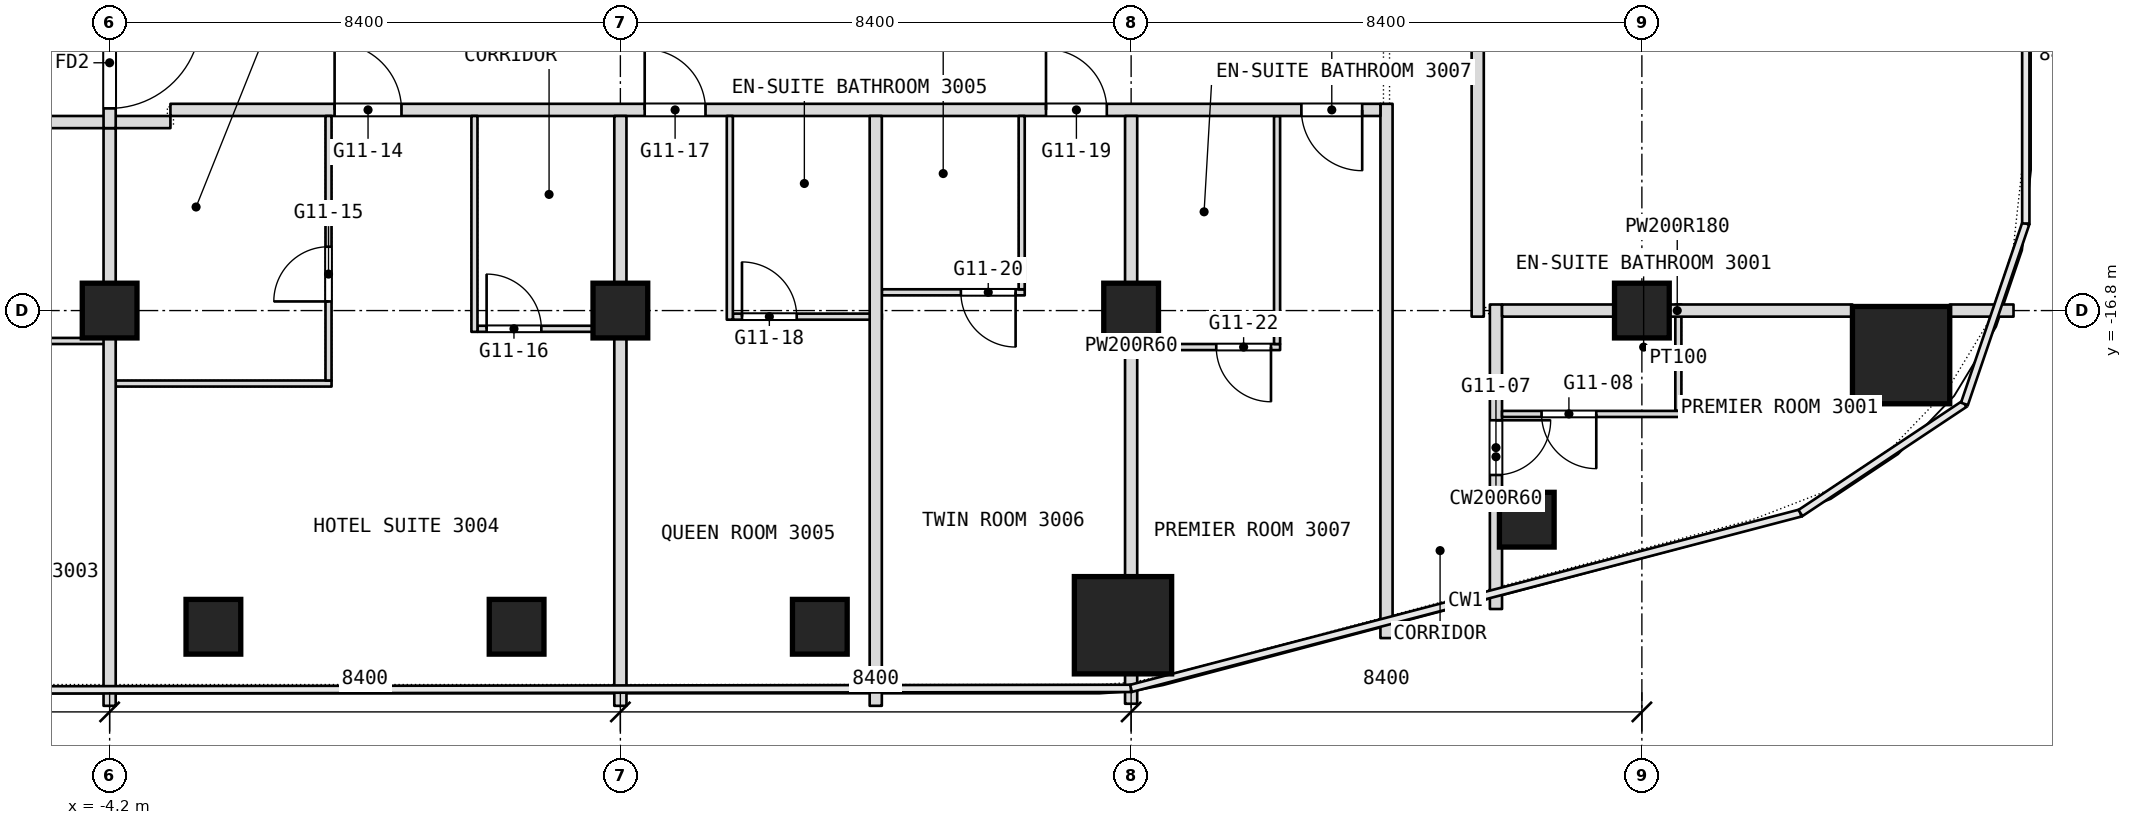
"""IFC4 building model, lengths in metres.
Left out: names, types, materials, properties, quantities, classifications, styles, units other than length and angle.
Written with IfcOpenShell. Run it as: python <this file> out.ifc"""

import sys

from ifc_helpers import new_model, si_unit, direction, frame, frame_2d, origin, origin_2d, place, context, subcontext, project, spatial, rectangle, extrude, element, fill, save


model = new_model("IFC4")
c1 = context("Model", 3, precision=1e-05, world=origin(), true_north=direction((0.0, 1.0)))
c2 = subcontext(c1, "Body", "Model", "MODEL_VIEW")
j1 = project(units=[si_unit("LENGTHUNIT", "METRE"), si_unit("PLANEANGLEUNIT", "RADIAN")], contexts=[c1])
p1 = place(None, origin())
s1 = spatial("IfcSite", under=j1, at=p1, CompositionType="ELEMENT")
p2 = place(p1, origin())
s2 = spatial("IfcBuilding", under=s1, at=p2, CompositionType="ELEMENT")
p3 = place(p2, frame((0.0, 0.0, 133.7)))
s3 = spatial("IfcBuildingStorey", under=s2, at=p3, CompositionType="ELEMENT", Elevation=133.7)
for number, where, z_axis, x_axis in (
    (1, (12.466, -21.975, 0.0), (0.0, 0.0, 1.0), (1.0, 0.0, 0.0)),
    (2, (25.263, -17.533, 0.0), (0.0, 0.0, 1.0), (1.0, 0.0, 0.0)),
):
    element("IfcColumn", number, at=place(p3, frame(where, z_axis=z_axis, x_axis=x_axis)), inside=s3, PredefinedType="COLUMN", context=c2, shape_type="SweptSolid", body=[
        extrude(rectangle(XDim=1.6, YDim=1.6, at=origin_2d()), origin(), (0.0, 0.0, 1.0), 3.6),
    ])
for number, where, z_axis, x_axis in (
    (3, (-4.2, -16.8, 0.0), (0.0, 0.0, 1.0), (1.0, 0.0, 0.0)),
    (4, (4.2, -16.8, 0.0), (0.0, 0.0, 1.0), (1.0, 0.0, 0.0)),
    (5, (12.6, -16.8, 0.0), (0.0, 0.0, 1.0), (1.0, 0.0, 0.0)),
    (6, (21.0, -16.8, 0.0), (0.0, 0.0, 1.0), (1.0, 0.0, 0.0)),
    (7, (19.107, -20.239, 0.0), (0.0, 0.0, 1.0), (1.0, 0.0, 0.0)),
    (8, (7.48, -22.0, 0.0), (0.0, 0.0, 1.0), (1.0, 0.0, 0.0)),
    (9, (2.493, -22.0, 0.0), (0.0, 0.0, 1.0), (1.0, 0.0, 0.0)),
    (10, (-2.493, -22.0, 0.0), (0.0, 0.0, 1.0), (1.0, 0.0, 0.0)),
):
    element("IfcColumn", number, at=place(p3, frame(where, z_axis=z_axis, x_axis=x_axis)), inside=s3, PredefinedType="COLUMN", context=c2, shape_type="SweptSolid", body=[
        extrude(rectangle(XDim=0.9, YDim=0.9, at=origin_2d()), origin(), (0.0, 0.0, 1.0), 3.6),
    ])
p4 = place(p3, frame((21.6, -18.45, 0.0), z_axis=(0.0, 0.0, 1.0), x_axis=(0.0, 1.0, 0.0)))
e11 = element("IfcWall", 11, at=p4, inside=s3, PredefinedType="PARTITIONING", context=c2, shape_type="SweptSolid", body=[
    extrude(rectangle(XDim=1.75, YDim=0.1, at=frame_2d((0.875, 0.0))), origin(), (0.0, 0.0, 1.0), 3.34),
])
p5 = place(p3, frame((18.6, -21.708, 0.0), z_axis=(0.0, 0.0, 1.0), x_axis=(0.0, 1.0, 0.0)))
e12 = element("IfcWall", 12, at=p5, inside=s3, PredefinedType="PARTITIONING", context=c2, shape_type="SweptSolid", body=[
    extrude(rectangle(XDim=5.008, YDim=0.2, at=frame_2d((2.504, 0.0))), origin(), (0.0, 0.0, 1.0), 3.34),
])
p6 = place(p5, frame((2.204, 0.0, 0.0)))
e13 = element("IfcOpeningElement", 13, at=p6, cuts=e12, PredefinedType="OPENING", context=c2, shape_type="SweptSolid", body=[
    extrude(rectangle(XDim=0.9, YDim=2.1, at=frame_2d((0.45, 1.05))), frame((0.0, 0.1, 0.0), z_axis=(0.0, -1.0, 0.0), x_axis=(1.0, 0.0, 0.0)), (0.0, 0.0, 1.0), 0.2),
])
p7 = place(p3, frame((18.7, -18.5, 0.0), z_axis=(0.0, 0.0, 1.0), x_axis=(1.0, 0.0, 0.0)))
e14 = element("IfcWall", 14, at=p7, inside=s3, PredefinedType="PARTITIONING", context=c2, shape_type="SweptSolid", body=[
    extrude(rectangle(XDim=2.95, YDim=0.1, at=frame_2d((1.475, 0.0))), origin(), (0.0, 0.0, 1.0), 3.34),
])
p8 = place(p7, frame((0.65, 0.0, 0.0)))
e15 = element("IfcOpeningElement", 15, at=p8, cuts=e14, PredefinedType="OPENING", context=c2, shape_type="SweptSolid", body=[
    extrude(rectangle(XDim=0.9, YDim=2.1, at=frame_2d((0.45, 1.05))), frame((0.0, 0.05, 0.0), z_axis=(0.0, -1.0, 0.0), x_axis=(1.0, 0.0, 0.0)), (0.0, 0.0, 1.0), 0.1),
])
p9 = place(p3, frame((18.3, -16.9, 0.0), z_axis=(0.0, 0.0, 1.0), x_axis=(0.0, 1.0, 0.0)))
e16 = element("IfcWall", 16, at=p9, inside=s3, PredefinedType="PARTITIONING", context=c2, shape_type="SweptSolid", body=[
    extrude(rectangle(XDim=33.6, YDim=0.2, at=frame_2d((16.8, 0.0))), origin(), (0.0, 0.0, 1.0), 3.34),
])
p10 = place(p3, frame((-4.1, -18.0, 0.0), z_axis=(0.0, 0.0, 1.0), x_axis=(1.0, 0.0, 0.0)))
e17 = element("IfcWall", 17, at=p10, inside=s3, PredefinedType="PARTITIONING", context=c2, shape_type="SweptSolid", body=[
    extrude(rectangle(XDim=3.55, YDim=0.1, at=frame_2d((1.775, 0.0))), origin(), (0.0, 0.0, 1.0), 3.34),
])
p11 = place(p3, frame((12.7, -17.4, 0.0), z_axis=(0.0, 0.0, 1.0), x_axis=(1.0, 0.0, 0.0)))
e18 = element("IfcWall", 18, at=p11, inside=s3, PredefinedType="PARTITIONING", context=c2, shape_type="SweptSolid", body=[
    extrude(rectangle(XDim=2.35, YDim=0.1, at=frame_2d((1.175, 0.0))), origin(), (0.0, 0.0, 1.0), 3.34),
])
p12 = place(p11, frame((1.3, 0.0, 0.0)))
e19 = element("IfcOpeningElement", 19, at=p12, cuts=e18, PredefinedType="OPENING", context=c2, shape_type="SweptSolid", body=[
    extrude(rectangle(XDim=0.9, YDim=2.1, at=frame_2d((0.45, 1.05))), frame((0.0, 0.05, 0.0), z_axis=(0.0, -1.0, 0.0), x_axis=(1.0, 0.0, 0.0)), (0.0, 0.0, 1.0), 0.1),
])
p13 = place(p3, frame((-6.55, -17.3, 0.0), z_axis=(0.0, 0.0, 1.0), x_axis=(1.0, 0.0, 0.0)))
e20 = element("IfcWall", 20, at=p13, inside=s3, PredefinedType="PARTITIONING", context=c2, shape_type="SweptSolid", body=[
    extrude(rectangle(XDim=2.45, YDim=0.1, at=frame_2d((1.225, 0.0))), origin(), (0.0, 0.0, 1.0), 3.34),
])
p14 = place(p13, frame((0.15, 0.0, 0.0)))
e21 = element("IfcOpeningElement", 21, at=p14, cuts=e20, PredefinedType="OPENING", context=c2, shape_type="SweptSolid", body=[
    extrude(rectangle(XDim=0.9, YDim=2.1, at=frame_2d((0.45, 1.05))), frame((0.0, 0.05, 0.0), z_axis=(0.0, -1.0, 0.0), x_axis=(1.0, 0.0, 0.0)), (0.0, 0.0, 1.0), 0.1),
])
p15 = place(p3, frame((1.85, -17.1, 0.0), z_axis=(0.0, 0.0, 1.0), x_axis=(1.0, 0.0, 0.0)))
e22 = element("IfcWall", 22, at=p15, inside=s3, PredefinedType="PARTITIONING", context=c2, shape_type="SweptSolid", body=[
    extrude(rectangle(XDim=2.45, YDim=0.1, at=frame_2d((1.225, 0.0))), origin(), (0.0, 0.0, 1.0), 3.34),
])
p16 = place(p15, frame((0.15, 0.0, 0.0)))
e23 = element("IfcOpeningElement", 23, at=p16, cuts=e22, PredefinedType="OPENING", context=c2, shape_type="SweptSolid", body=[
    extrude(rectangle(XDim=0.9, YDim=2.1, at=frame_2d((0.45, 1.05))), frame((0.0, 0.05, 0.0), z_axis=(0.0, -1.0, 0.0), x_axis=(1.0, 0.0, 0.0)), (0.0, 0.0, 1.0), 0.1),
])
p17 = place(p3, frame((6.05, -16.9, 0.0), z_axis=(0.0, 0.0, 1.0), x_axis=(1.0, 0.0, 0.0)))
e24 = element("IfcWall", 24, at=p17, inside=s3, PredefinedType="PARTITIONING", context=c2, shape_type="SweptSolid", body=[
    extrude(rectangle(XDim=2.45, YDim=0.1, at=frame_2d((1.225, 0.0))), origin(), (0.0, 0.0, 1.0), 2.89),
])
p18 = place(p17, frame((0.15, 0.0, 0.0)))
e25 = element("IfcOpeningElement", 25, at=p18, cuts=e24, PredefinedType="OPENING", context=c2, shape_type="SweptSolid", body=[
    extrude(rectangle(XDim=0.9, YDim=2.1, at=frame_2d((0.45, 1.05))), frame((0.0, 0.05, 0.0), z_axis=(0.0, -1.0, 0.0), x_axis=(1.0, 0.0, 0.0)), (0.0, 0.0, 1.0), 0.1),
])
p19 = place(p3, frame((16.8, -22.186, 0.0), z_axis=(0.0, 0.0, 1.0), x_axis=(0.0, 1.0, 0.0)))
e26 = element("IfcWall", 26, at=p19, inside=s3, PredefinedType="PARTITIONING", context=c2, shape_type="SweptSolid", body=[
    extrude(rectangle(XDim=8.786, YDim=0.2, at=frame_2d((4.393, 0.0))), origin(), (0.0, 0.0, 1.0), 3.34),
])
p20 = place(p3, frame((18.7, -16.8, 0.0), z_axis=(0.0, 0.0, 1.0), x_axis=(1.0, 0.0, 0.0)))
e27 = element("IfcWall", 27, at=p20, inside=s3, PredefinedType="PARTITIONING", context=c2, shape_type="SweptSolid", body=[
    extrude(rectangle(XDim=5.763, YDim=0.2, at=frame_2d((2.881, 0.0))), origin(), (0.0, 0.0, 1.0), 2.89),
])
p21 = place(p3, frame((26.063, -16.8, 0.0), z_axis=(0.0, 0.0, 1.0), x_axis=(1.0, 0.0, 0.0)))
e28 = element("IfcWall", 28, at=p21, inside=s3, PredefinedType="PARTITIONING", context=c2, shape_type="SweptSolid", body=[
    extrude(rectangle(XDim=1.049, YDim=0.2, at=frame_2d((0.524, 0.0))), origin(), (0.0, 0.0, 1.0), 3.34),
])
p22 = place(p3, frame((8.5, -16.5, 0.0), z_axis=(0.0, 0.0, 1.0), x_axis=(1.0, 0.0, 0.0)))
e29 = element("IfcWall", 29, at=p22, inside=s3, PredefinedType="PARTITIONING", context=c2, shape_type="SweptSolid", body=[
    extrude(rectangle(XDim=2.35, YDim=0.1, at=frame_2d((1.175, 0.0))), origin(), (0.0, 0.0, 1.0), 3.34),
])
p23 = place(p22, frame((1.3, 0.0, 0.0)))
e30 = element("IfcOpeningElement", 30, at=p23, cuts=e29, PredefinedType="OPENING", context=c2, shape_type="SweptSolid", body=[
    extrude(rectangle(XDim=0.9, YDim=2.1, at=frame_2d((0.45, 1.05))), frame((0.0, 0.05, 0.0), z_axis=(0.0, -1.0, 0.0), x_axis=(1.0, 0.0, 0.0)), (0.0, 0.0, 1.0), 0.1),
])
p24 = place(p3, frame((15.0, -17.35, 0.0), z_axis=(0.0, 0.0, 1.0), x_axis=(0.0, 1.0, 0.0)))
e31 = element("IfcWall", 31, at=p24, inside=s3, PredefinedType="PARTITIONING", context=c2, shape_type="SweptSolid", body=[
    extrude(rectangle(XDim=3.75, YDim=0.1, at=frame_2d((1.875, 0.0))), origin(), (0.0, 0.0, 1.0), 3.34),
])
p25 = place(p3, frame((-12.4, -13.7, 0.0), z_axis=(0.0, 0.0, 1.0), x_axis=(1.0, 0.0, 0.0)))
e32 = element("IfcWall", 32, at=p25, inside=s3, PredefinedType="PARTITIONING", context=c2, shape_type="SweptSolid", body=[
    extrude(rectangle(XDim=9.2, YDim=0.2, at=frame_2d((4.6, 0.0))), origin(), (0.0, 0.0, 1.0), 3.34),
])
p26 = place(p25, frame((1.35, 0.0, 0.0)))
e33 = element("IfcOpeningElement", 33, at=p26, cuts=e32, PredefinedType="OPENING", context=c2, shape_type="SweptSolid", body=[
    extrude(rectangle(XDim=1.1, YDim=2.1, at=frame_2d((0.55, 1.05))), frame((0.0, 0.1, 0.0), z_axis=(0.0, -1.0, 0.0), x_axis=(1.0, 0.0, 0.0)), (0.0, 0.0, 1.0), 0.2),
])
p27 = place(p3, frame((-3.2, -13.5, 0.0), z_axis=(0.0, 0.0, 1.0), x_axis=(1.0, 0.0, 0.0)))
e34 = element("IfcWall", 34, at=p27, inside=s3, PredefinedType="PARTITIONING", context=c2, shape_type="SweptSolid", body=[
    extrude(rectangle(XDim=19.9, YDim=0.2, at=frame_2d((9.95, 0.0))), origin(), (0.0, 0.0, 1.0), 3.34),
])
p28 = place(p27, frame((2.7, 0.0, 0.0)))
e35 = element("IfcOpeningElement", 35, at=p28, cuts=e34, PredefinedType="OPENING", context=c2, shape_type="SweptSolid", body=[
    extrude(rectangle(XDim=1.1, YDim=2.1, at=frame_2d((0.55, 1.05))), frame((0.0, 0.1, 0.0), z_axis=(0.0, -1.0, 0.0), x_axis=(1.0, 0.0, 0.0)), (0.0, 0.0, 1.0), 0.2),
])
p29 = place(p27, frame((7.8, 0.0, 0.0)))
e36 = element("IfcOpeningElement", 36, at=p29, cuts=e34, PredefinedType="OPENING", context=c2, shape_type="SweptSolid", body=[
    extrude(rectangle(XDim=1.0, YDim=2.1, at=frame_2d((0.5, 1.05))), frame((0.0, 0.1, 0.0), z_axis=(0.0, -1.0, 0.0), x_axis=(1.0, 0.0, 0.0)), (0.0, 0.0, 1.0), 0.2),
])
p30 = place(p27, frame((14.4, 0.0, 0.0)))
e37 = element("IfcOpeningElement", 37, at=p30, cuts=e34, PredefinedType="OPENING", context=c2, shape_type="SweptSolid", body=[
    extrude(rectangle(XDim=1.0, YDim=2.1, at=frame_2d((0.5, 1.05))), frame((0.0, 0.1, 0.0), z_axis=(0.0, -1.0, 0.0), x_axis=(1.0, 0.0, 0.0)), (0.0, 0.0, 1.0), 0.2),
])
p31 = place(p27, frame((18.6, 0.0, 0.0)))
e38 = element("IfcOpeningElement", 38, at=p31, cuts=e34, PredefinedType="OPENING", context=c2, shape_type="SweptSolid", body=[
    extrude(rectangle(XDim=1.0, YDim=2.1, at=frame_2d((0.5, 1.05))), frame((0.0, 0.1, 0.0), z_axis=(0.0, -1.0, 0.0), x_axis=(1.0, 0.0, 0.0)), (0.0, 0.0, 1.0), 0.2),
])
p32 = place(p3, frame((12.6, -23.266, 0.0), z_axis=(0.0, 0.0, 1.0), x_axis=(0.0, 1.0, 0.0)))
e39 = element("IfcWall", 39, at=p32, inside=s3, PredefinedType="PARTITIONING", context=c2, shape_type="SweptSolid", body=[
    extrude(rectangle(XDim=0.491, YDim=0.2, at=frame_2d((0.246, 0.0))), origin(), (0.0, 0.0, 1.0), 3.34),
])
p33 = place(p3, frame((12.6, -21.175, 0.0), z_axis=(0.0, 0.0, 1.0), x_axis=(0.0, 1.0, 0.0)))
e40 = element("IfcWall", 40, at=p33, inside=s3, PredefinedType="PARTITIONING", context=c2, shape_type="SweptSolid", body=[
    extrude(rectangle(XDim=7.575, YDim=0.2, at=frame_2d((3.788, 0.0))), origin(), (0.0, 0.0, 1.0), 3.34),
])
p34 = place(p3, frame((10.8, -16.45, 0.0), z_axis=(0.0, 0.0, 1.0), x_axis=(0.0, 1.0, 0.0)))
e41 = element("IfcWall", 41, at=p34, inside=s3, PredefinedType="PARTITIONING", context=c2, shape_type="SweptSolid", body=[
    extrude(rectangle(XDim=2.85, YDim=0.1, at=frame_2d((1.425, 0.0))), origin(), (0.0, 0.0, 1.0), 3.34),
])
p35 = place(p3, frame((8.4, -23.3, 0.0), z_axis=(0.0, 0.0, 1.0), x_axis=(0.0, 1.0, 0.0)))
e42 = element("IfcWall", 42, at=p35, inside=s3, PredefinedType="PARTITIONING", context=c2, shape_type="SweptSolid", body=[
    extrude(rectangle(XDim=9.7, YDim=0.2, at=frame_2d((4.85, 0.0))), origin(), (0.0, 0.0, 1.0), 3.34),
])
p36 = place(p3, frame((6.0, -16.95, 0.0), z_axis=(0.0, 0.0, 1.0), x_axis=(0.0, 1.0, 0.0)))
e43 = element("IfcWall", 43, at=p36, inside=s3, PredefinedType="PARTITIONING", context=c2, shape_type="SweptSolid", body=[
    extrude(rectangle(XDim=3.35, YDim=0.1, at=frame_2d((1.675, 0.0))), origin(), (0.0, 0.0, 1.0), 3.34),
])
p37 = place(p3, frame((4.2, -23.3, 0.0), z_axis=(0.0, 0.0, 1.0), x_axis=(0.0, 1.0, 0.0)))
e44 = element("IfcWall", 44, at=p37, inside=s3, PredefinedType="PARTITIONING", context=c2, shape_type="SweptSolid", body=[
    extrude(rectangle(XDim=9.7, YDim=0.2, at=frame_2d((4.85, 0.0))), origin(), (0.0, 0.0, 1.0), 3.34),
])
p38 = place(p3, frame((1.8, -17.15, 0.0), z_axis=(0.0, 0.0, 1.0), x_axis=(0.0, 1.0, 0.0)))
e45 = element("IfcWall", 45, at=p38, inside=s3, PredefinedType="PARTITIONING", context=c2, shape_type="SweptSolid", body=[
    extrude(rectangle(XDim=3.55, YDim=0.1, at=frame_2d((1.775, 0.0))), origin(), (0.0, 0.0, 1.0), 3.34),
])
p39 = place(p3, frame((-0.6, -17.95, 0.0), z_axis=(0.0, 0.0, 1.0), x_axis=(0.0, 1.0, 0.0)))
e46 = element("IfcWall", 46, at=p39, inside=s3, PredefinedType="PARTITIONING", context=c2, shape_type="SweptSolid", body=[
    extrude(rectangle(XDim=4.35, YDim=0.1, at=frame_2d((2.175, 0.0))), origin(), (0.0, 0.0, 1.0), 3.34),
])
p40 = place(p39, frame((1.3, 0.0, 0.0)))
e47 = element("IfcOpeningElement", 47, at=p40, cuts=e46, PredefinedType="OPENING", context=c2, shape_type="SweptSolid", body=[
    extrude(rectangle(XDim=0.9, YDim=2.1, at=frame_2d((0.45, 1.05))), frame((0.0, 0.05, 0.0), z_axis=(0.0, -1.0, 0.0), x_axis=(1.0, 0.0, 0.0)), (0.0, 0.0, 1.0), 0.1),
])
p41 = place(p3, frame((-4.2, -23.3, 0.0), z_axis=(0.0, 0.0, 1.0), x_axis=(0.0, 1.0, 0.0)))
e48 = element("IfcWall", 48, at=p41, inside=s3, PredefinedType="PARTITIONING", context=c2, shape_type="SweptSolid", body=[
    extrude(rectangle(XDim=9.5, YDim=0.2, at=frame_2d((4.75, 0.0))), origin(), (0.0, 0.0, 1.0), 3.34),
])
p42 = place(p3, frame((-4.2, -13.8, 0.0), z_axis=(0.0, 0.0, 1.0), x_axis=(0.0, 1.0, 0.0)))
e49 = element("IfcWall", 49, at=p42, inside=s3, PredefinedType="PARTITIONING", context=c2, shape_type="SweptSolid", body=[
    extrude(rectangle(XDim=13.8, YDim=0.2, at=frame_2d((6.9, 0.0))), origin(), (0.0, 0.0, 1.0), 3.34),
])
p43 = place(p42, frame((12.15, 0.0, 0.0)))
e50 = element("IfcOpeningElement", 50, at=p43, cuts=e49, PredefinedType="OPENING", context=c2, shape_type="SweptSolid", body=[
    extrude(rectangle(XDim=1.5, YDim=2.1, at=frame_2d((0.75, 1.05))), frame((0.0, 0.1, 0.0), z_axis=(0.0, -1.0, 0.0), x_axis=(1.0, 0.0, 0.0)), (0.0, 0.0, 1.0), 0.2),
])
p44 = place(p42, frame((0.325, 0.0, 0.0)))
e51 = element("IfcOpeningElement", 51, at=p44, cuts=e49, PredefinedType="OPENING", context=c2, shape_type="SweptSolid", body=[
    extrude(rectangle(XDim=1.5, YDim=2.1, at=frame_2d((0.75, 1.05))), frame((0.0, 0.1, 0.0), z_axis=(0.0, -1.0, 0.0), x_axis=(1.0, 0.0, 0.0)), (0.0, 0.0, 1.0), 0.2),
])
p45 = place(p6, origin())
e52 = element("IfcDoor", 52, at=p45, inside=s3, OperationType="SINGLE_SWING_LEFT", PredefinedType="DOOR", context=c2, shape_type="SweptSolid", body=[
    extrude(rectangle(XDim=0.9, YDim=2.1, at=frame_2d((0.45, 1.05))), frame((0.0, 0.025, 0.0), z_axis=(0.0, -1.0, 0.0), x_axis=(1.0, 0.0, 0.0)), (0.0, 0.0, 1.0), 0.05),
])
fill(e13, e52)
p46 = place(p8, origin())
e53 = element("IfcDoor", 53, at=p46, inside=s3, OperationType="SINGLE_SWING_LEFT", PredefinedType="DOOR", context=c2, shape_type="SweptSolid", body=[
    extrude(rectangle(XDim=0.9, YDim=2.1, at=frame_2d((0.45, 1.05))), frame((0.0, 0.025, 0.0), z_axis=(0.0, -1.0, 0.0), x_axis=(1.0, 0.0, 0.0)), (0.0, 0.0, 1.0), 0.05),
])
fill(e15, e53)
p47 = place(p12, origin())
e54 = element("IfcDoor", 54, at=p47, inside=s3, OperationType="SINGLE_SWING_RIGHT", PredefinedType="DOOR", context=c2, shape_type="SweptSolid", body=[
    extrude(rectangle(XDim=0.9, YDim=2.1, at=frame_2d((0.45, 1.05))), frame((0.0, 0.025, 0.0), z_axis=(0.0, -1.0, 0.0), x_axis=(1.0, 0.0, 0.0)), (0.0, 0.0, 1.0), 0.05),
])
fill(e19, e54)
p48 = place(p16, origin())
e55 = element("IfcDoor", 55, at=p48, inside=s3, OperationType="SINGLE_SWING_LEFT", PredefinedType="DOOR", context=c2, shape_type="SweptSolid", body=[
    extrude(rectangle(XDim=0.9, YDim=2.1, at=frame_2d((0.45, 1.05))), frame((0.0, 0.025, 0.0), z_axis=(0.0, -1.0, 0.0), x_axis=(1.0, 0.0, 0.0)), (0.0, 0.0, 1.0), 0.05),
])
fill(e23, e55)
p49 = place(p18, origin())
e56 = element("IfcDoor", 56, at=p49, inside=s3, OperationType="SINGLE_SWING_LEFT", PredefinedType="DOOR", context=c2, shape_type="SweptSolid", body=[
    extrude(rectangle(XDim=0.9, YDim=2.1, at=frame_2d((0.45, 1.05))), frame((0.0, 0.025, 0.0), z_axis=(0.0, -1.0, 0.0), x_axis=(1.0, 0.0, 0.0)), (0.0, 0.0, 1.0), 0.05),
])
fill(e25, e56)
p50 = place(p23, origin())
e57 = element("IfcDoor", 57, at=p50, inside=s3, OperationType="SINGLE_SWING_RIGHT", PredefinedType="DOOR", context=c2, shape_type="SweptSolid", body=[
    extrude(rectangle(XDim=0.9, YDim=2.1, at=frame_2d((0.45, 1.05))), frame((0.0, 0.025, 0.0), z_axis=(0.0, -1.0, 0.0), x_axis=(1.0, 0.0, 0.0)), (0.0, 0.0, 1.0), 0.05),
])
fill(e30, e57)
p51 = place(p28, origin())
e58 = element("IfcDoor", 58, at=p51, inside=s3, OperationType="SINGLE_SWING_RIGHT", PredefinedType="DOOR", context=c2, shape_type="SweptSolid", body=[
    extrude(rectangle(XDim=1.1, YDim=2.1, at=frame_2d((0.55, 1.05))), frame((0.0, 0.025, 0.0), z_axis=(0.0, -1.0, 0.0), x_axis=(1.0, 0.0, 0.0)), (0.0, 0.0, 1.0), 0.05),
])
fill(e35, e58)
p52 = place(p29, origin())
e59 = element("IfcDoor", 59, at=p52, inside=s3, OperationType="SINGLE_SWING_LEFT", PredefinedType="DOOR", context=c2, shape_type="SweptSolid", body=[
    extrude(rectangle(XDim=1.0, YDim=2.1, at=frame_2d((0.5, 1.05))), frame((0.0, 0.025, 0.0), z_axis=(0.0, -1.0, 0.0), x_axis=(1.0, 0.0, 0.0)), (0.0, 0.0, 1.0), 0.05),
])
fill(e36, e59)
p53 = place(p30, origin())
e60 = element("IfcDoor", 60, at=p53, inside=s3, OperationType="SINGLE_SWING_LEFT", PredefinedType="DOOR", context=c2, shape_type="SweptSolid", body=[
    extrude(rectangle(XDim=1.0, YDim=2.1, at=frame_2d((0.5, 1.05))), frame((0.0, 0.025, 0.0), z_axis=(0.0, -1.0, 0.0), x_axis=(1.0, 0.0, 0.0)), (0.0, 0.0, 1.0), 0.05),
])
fill(e37, e60)
p54 = place(p31, origin())
e61 = element("IfcDoor", 61, at=p54, inside=s3, OperationType="SINGLE_SWING_LEFT", PredefinedType="DOOR", context=c2, shape_type="SweptSolid", body=[
    extrude(rectangle(XDim=1.0, YDim=2.1, at=frame_2d((0.5, 1.05))), frame((0.0, 0.025, 0.0), z_axis=(0.0, -1.0, 0.0), x_axis=(1.0, 0.0, 0.0)), (0.0, 0.0, 1.0), 0.05),
])
fill(e38, e61)
p55 = place(p40, origin())
e62 = element("IfcDoor", 62, at=p55, inside=s3, OperationType="SINGLE_SWING_LEFT", PredefinedType="DOOR", context=c2, shape_type="SweptSolid", body=[
    extrude(rectangle(XDim=0.9, YDim=2.1, at=frame_2d((0.45, 1.05))), frame((0.0, 0.025, 0.0), z_axis=(0.0, -1.0, 0.0), x_axis=(1.0, 0.0, 0.0)), (0.0, 0.0, 1.0), 0.05),
])
fill(e47, e62)
p56 = place(p44, origin())
e63 = element("IfcDoor", 63, at=p56, inside=s3, OperationType="DOUBLE_DOOR_DOUBLE_SWING", PredefinedType="DOOR", context=c2, shape_type="SweptSolid", body=[
    extrude(rectangle(XDim=1.5, YDim=2.1, at=frame_2d((0.75, 1.05))), frame((0.0, 0.025, 0.0), z_axis=(0.0, -1.0, 0.0), x_axis=(1.0, 0.0, 0.0)), (0.0, 0.0, 1.0), 0.05),
])
fill(e51, e63)
save(model, sys.argv[1])
